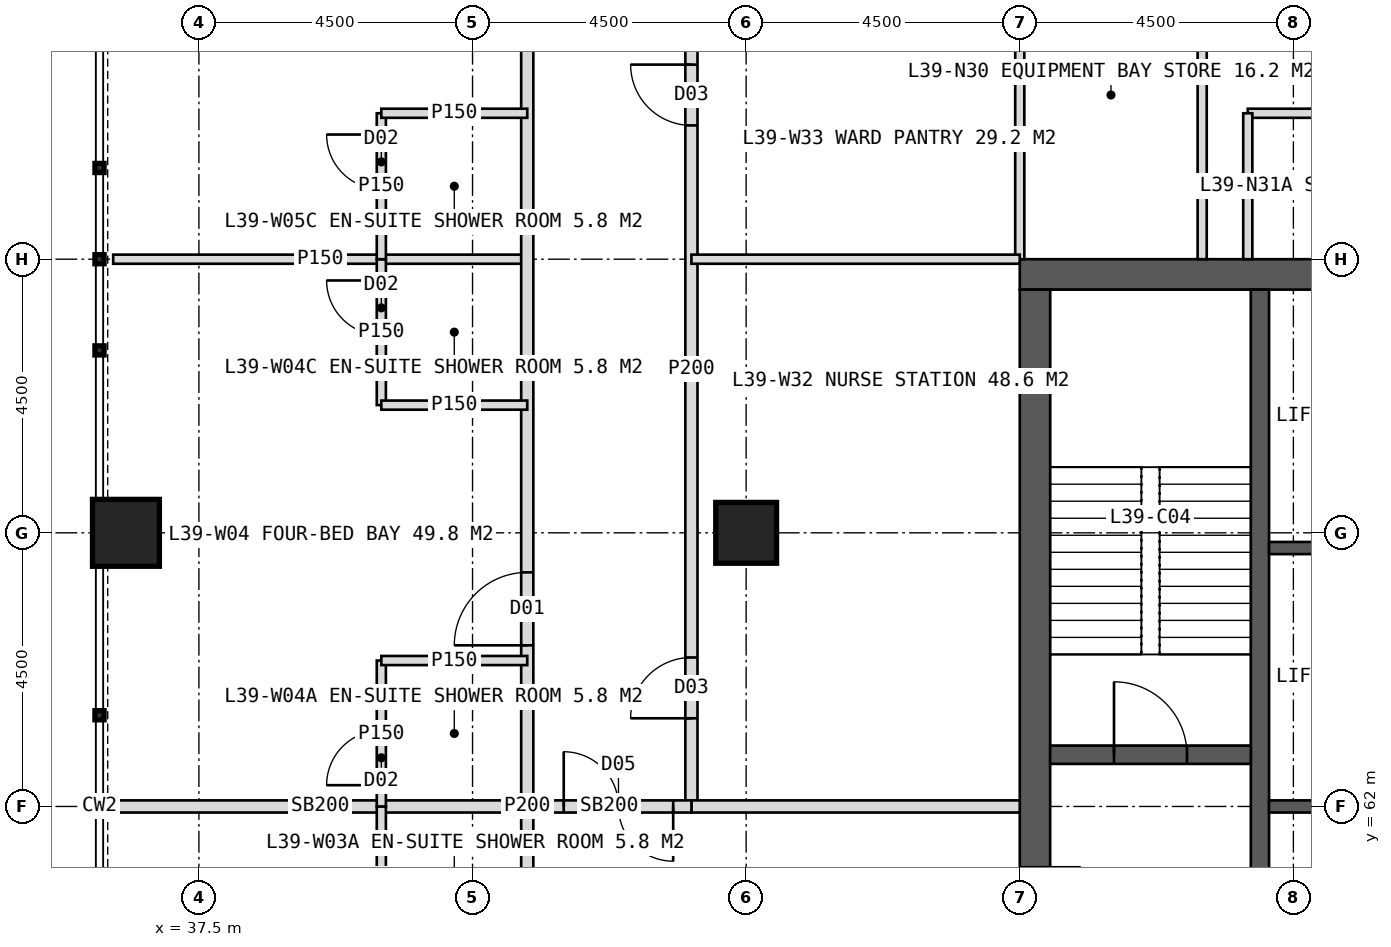
"""IFC4 building model, lengths in metres.
Left out: names, types, materials, properties, quantities, classifications, styles, units other than length and angle.
Written with IfcOpenShell. Run it as: python <this file> out.ifc"""

import sys

from ifc_helpers import new_model, si_unit, direction, frame, frame_2d, origin, origin_2d, place, context, subcontext, project, spatial, rectangle, hollow_rectangle, extrude, element, fill, save


model = new_model("IFC4")
c1 = context("Model", 3, precision=1e-05, world=origin(), true_north=direction((0.0, 1.0)))
c2 = subcontext(c1, "Body", "Model", "MODEL_VIEW")
j1 = project(units=[si_unit("LENGTHUNIT", "METRE"), si_unit("PLANEANGLEUNIT", "RADIAN")], contexts=[c1])
p1 = place(None, origin())
s1 = spatial("IfcSite", under=j1, at=p1, CompositionType="ELEMENT")
p2 = place(p1, origin())
s2 = spatial("IfcBuilding", under=s1, at=p2, CompositionType="ELEMENT")
p3 = place(p2, frame((0.0, 0.0, 164.0)))
s3 = spatial("IfcBuildingStorey", under=s2, at=p3, CompositionType="ELEMENT", Elevation=164.0)
p4 = place(p3, frame((51.0, 70.75, 0.0), z_axis=(0.0, 0.0, 1.0), x_axis=(1.0, 0.0, 0.0)))
e1 = element("IfcWall", 1, at=p4, inside=s3, PredefinedType="SHEAR", context=c2, shape_type="SweptSolid", body=[
    extrude(rectangle(XDim=18.0, YDim=0.5, at=frame_2d((9.0, 0.0))), origin(), (0.0, 0.0, 1.0), 4.0),
])
p5 = place(p4, frame((8.1, 0.0, 0.0)))
e2 = element("IfcOpeningElement", 2, at=p5, cuts=e1, PredefinedType="OPENING", context=c2, shape_type="SweptSolid", body=[
    extrude(rectangle(XDim=1.8, YDim=2.2, at=frame_2d((0.9, 1.1))), frame((0.0, 0.26, 0.0), z_axis=(0.0, -1.0, 0.0), x_axis=(1.0, 0.0, 0.0)), (0.0, 0.0, 1.0), 0.52),
])
p6 = place(p3, frame((51.25, 53.5, 0.0), z_axis=(0.0, 0.0, 1.0), x_axis=(0.0, 1.0, 0.0)))
e3 = element("IfcWall", 3, at=p6, inside=s3, PredefinedType="SHEAR", context=c2, shape_type="SweptSolid", body=[
    extrude(rectangle(XDim=17.0, YDim=0.5, at=frame_2d((8.5, 0.0))), origin(), (0.0, 0.0, 1.0), 4.0),
])
p7 = place(p6, frame((6.0, 0.0, 0.0)))
e4 = element("IfcOpeningElement", 4, at=p7, cuts=e3, PredefinedType="OPENING", context=c2, shape_type="SweptSolid", body=[
    extrude(rectangle(XDim=1.5, YDim=2.2, at=frame_2d((0.75, 1.1))), frame((0.0, 0.26, 0.0), z_axis=(0.0, -1.0, 0.0), x_axis=(1.0, 0.0, 0.0)), (0.0, 0.0, 1.0), 0.52),
])
p8 = place(p3, frame((54.95, 53.5, 0.0), z_axis=(0.0, 0.0, 1.0), x_axis=(0.0, 1.0, 0.0)))
e5 = element("IfcWall", 5, at=p8, inside=s3, PredefinedType="SHEAR", context=c2, shape_type="SweptSolid", body=[
    extrude(rectangle(XDim=17.0, YDim=0.3, at=frame_2d((8.5, 0.0))), origin(), (0.0, 0.0, 1.0), 4.0),
])
for number, where, z_axis, x_axis in (
    (6, (55.1, 62.0, 0.0), (0.0, 0.0, 1.0), (1.0, 0.0, 0.0)),
    (7, (55.1, 66.25, 0.0), (0.0, 0.0, 1.0), (1.0, 0.0, 0.0)),
):
    element("IfcWall", number, at=place(p3, frame(where, z_axis=z_axis, x_axis=x_axis)), inside=s3, PredefinedType="SHEAR", context=c2, shape_type="SweptSolid", body=[
        extrude(rectangle(XDim=3.05, YDim=0.2, at=frame_2d((1.525, 0.0))), origin(), (0.0, 0.0, 1.0), 4.0),
    ])
p9 = place(p3, frame((51.5, 62.85, 0.0), z_axis=(0.0, 0.0, 1.0), x_axis=(1.0, 0.0, 0.0)))
e8 = element("IfcWall", 8, at=p9, inside=s3, PredefinedType="SHEAR", context=c2, shape_type="SweptSolid", body=[
    extrude(rectangle(XDim=3.3, YDim=0.3, at=frame_2d((1.65, 0.0))), origin(), (0.0, 0.0, 1.0), 4.0),
])
p10 = place(p9, frame((1.05, 0.0, 0.0)))
e9 = element("IfcOpeningElement", 9, at=p10, cuts=e8, PredefinedType="OPENING", context=c2, shape_type="SweptSolid", body=[
    extrude(rectangle(XDim=1.2, YDim=2.1, at=frame_2d((0.6, 1.05))), frame((0.0, 0.16, 0.0), z_axis=(0.0, -1.0, 0.0), x_axis=(1.0, 0.0, 0.0)), (0.0, 0.0, 1.0), 0.32),
])
p11 = place(p3, frame((46.5, 66.5, 0.0), z_axis=(0.0, 0.0, 1.0), x_axis=(1.0, 0.0, 0.0)))
e10 = element("IfcColumn", 10, at=p11, inside=s3, PredefinedType="COLUMN", context=c2, shape_type="SweptSolid", body=[
    extrude(hollow_rectangle(XDim=1.0, YDim=1.0, WallThickness=0.1, at=origin_2d()), origin(), (0.0, 0.0, 1.0), 4.0),
])
p12 = place(p3, frame((36.3, 66.5, 0.0), z_axis=(0.0, 0.0, 1.0), x_axis=(1.0, 0.0, 0.0)))
e11 = element("IfcColumn", 11, at=p12, inside=s3, PredefinedType="COLUMN", context=c2, shape_type="SweptSolid", body=[
    extrude(hollow_rectangle(XDim=1.1, YDim=1.1, WallThickness=0.1, at=origin_2d()), origin(), (0.0, 0.0, 1.0), 4.0),
])
for number, where, z_axis, x_axis in (
    (12, (51.0, 71.0, 0.0), (0.0, 0.0, 1.0), (0.0, 1.0, 0.0)),
    (13, (54.0, 71.0, 0.0), (0.0, 0.0, 1.0), (0.0, 1.0, 0.0)),
):
    element("IfcWall", number, at=place(p3, frame(where, z_axis=z_axis, x_axis=x_axis)), inside=s3, PredefinedType="PARTITIONING", context=c2, shape_type="SweptSolid", body=[
        extrude(rectangle(XDim=5.4, YDim=0.15, at=frame_2d((2.7, 0.0))), origin(), (0.0, 0.0, 1.0), 3.75),
    ])
p13 = place(p3, frame((54.75, 73.4, 0.0), z_axis=(0.0, 0.0, 1.0), x_axis=(1.0, 0.0, 0.0)))
e14 = element("IfcWall", 14, at=p13, inside=s3, PredefinedType="PARTITIONING", context=c2, shape_type="SweptSolid", body=[
    extrude(rectangle(XDim=3.0, YDim=0.15, at=frame_2d((1.5, 0.0))), origin(), (0.0, 0.0, 1.0), 3.75),
])
p14 = place(p3, frame((54.75, 71.0, 0.0), z_axis=(0.0, 0.0, 1.0), x_axis=(0.0, 1.0, 0.0)))
e15 = element("IfcWall", 15, at=p14, inside=s3, PredefinedType="PARTITIONING", context=c2, shape_type="SweptSolid", body=[
    extrude(rectangle(XDim=2.4, YDim=0.15, at=frame_2d((1.2, 0.0))), origin(), (0.0, 0.0, 1.0), 3.75),
])
p15 = place(p3, frame((42.9, 62.0, 0.0), z_axis=(0.0, 0.0, 1.0), x_axis=(-1.0, 0.0, 0.0)))
e16 = element("IfcWall", 16, at=p15, inside=s3, PredefinedType="SOLIDWALL", context=c2, shape_type="SweptSolid", body=[
    extrude(rectangle(XDim=6.81, YDim=0.2, at=frame_2d((3.405, 0.0))), origin(), (0.0, 0.0, 1.0), 2.95),
])
p16 = place(p3, frame((42.9, 71.0, 0.0), z_axis=(0.0, 0.0, 1.0), x_axis=(-1.0, 0.0, 0.0)))
e17 = element("IfcWall", 17, at=p16, inside=s3, PredefinedType="PARTITIONING", context=c2, shape_type="SweptSolid", body=[
    extrude(rectangle(XDim=6.81, YDim=0.15, at=frame_2d((3.405, 0.0))), origin(), (0.0, 0.0, 1.0), 3.75),
])
p17 = place(p3, frame((42.9, 44.9, 0.0), z_axis=(0.0, 0.0, 1.0), x_axis=(0.0, 1.0, 0.0)))
e18 = element("IfcWall", 18, at=p17, inside=s3, PredefinedType="PARTITIONING", context=c2, shape_type="SweptSolid", body=[
    extrude(rectangle(XDim=34.2, YDim=0.2, at=frame_2d((17.1, 0.0))), origin(), (0.0, 0.0, 1.0), 3.75),
])
p18 = place(p17, frame((2.15, 0.0, 0.0)))
e19 = element("IfcOpeningElement", 19, at=p18, cuts=e18, PredefinedType="OPENING", context=c2, shape_type="SweptSolid", body=[
    extrude(rectangle(XDim=1.2, YDim=2.2, at=frame_2d((0.6, 1.1))), frame((0.0, 0.11, 0.0), z_axis=(0.0, -1.0, 0.0), x_axis=(1.0, 0.0, 0.0)), (0.0, 0.0, 1.0), 0.22),
])
p19 = place(p17, frame((9.25, 0.0, 0.0)))
e20 = element("IfcOpeningElement", 20, at=p19, cuts=e18, PredefinedType="OPENING", context=c2, shape_type="SweptSolid", body=[
    extrude(rectangle(XDim=1.2, YDim=2.2, at=frame_2d((0.6, 1.1))), frame((0.0, 0.11, 0.0), z_axis=(0.0, -1.0, 0.0), x_axis=(1.0, 0.0, 0.0)), (0.0, 0.0, 1.0), 0.22),
])
p20 = place(p17, frame((13.25, 0.0, 0.0)))
e21 = element("IfcOpeningElement", 21, at=p20, cuts=e18, PredefinedType="OPENING", context=c2, shape_type="SweptSolid", body=[
    extrude(rectangle(XDim=1.2, YDim=2.2, at=frame_2d((0.6, 1.1))), frame((0.0, 0.11, 0.0), z_axis=(0.0, -1.0, 0.0), x_axis=(1.0, 0.0, 0.0)), (0.0, 0.0, 1.0), 0.22),
])
p21 = place(p17, frame((19.75, 0.0, 0.0)))
e22 = element("IfcOpeningElement", 22, at=p21, cuts=e18, PredefinedType="OPENING", context=c2, shape_type="SweptSolid", body=[
    extrude(rectangle(XDim=1.2, YDim=2.2, at=frame_2d((0.6, 1.1))), frame((0.0, 0.11, 0.0), z_axis=(0.0, -1.0, 0.0), x_axis=(1.0, 0.0, 0.0)), (0.0, 0.0, 1.0), 0.22),
])
p22 = place(p17, frame((30.35, 0.0, 0.0)))
e23 = element("IfcOpeningElement", 23, at=p22, cuts=e18, PredefinedType="OPENING", context=c2, shape_type="SweptSolid", body=[
    extrude(rectangle(XDim=1.2, YDim=2.2, at=frame_2d((0.6, 1.1))), frame((0.0, 0.11, 0.0), z_axis=(0.0, -1.0, 0.0), x_axis=(1.0, 0.0, 0.0)), (0.0, 0.0, 1.0), 0.22),
])
p23 = place(p3, frame((40.5, 59.6, 0.0), z_axis=(0.0, 0.0, 1.0), x_axis=(0.0, 1.0, 0.0)))
e24 = element("IfcWall", 24, at=p23, inside=s3, PredefinedType="PARTITIONING", context=c2, shape_type="SweptSolid", body=[
    extrude(rectangle(XDim=2.4, YDim=0.15, at=frame_2d((1.2, 0.0))), origin(), (0.0, 0.0, 1.0), 3.75),
])
p24 = place(p23, frame((0.35, 0.0, 0.0)))
e25 = element("IfcOpeningElement", 25, at=p24, cuts=e24, PredefinedType="OPENING", context=c2, shape_type="SweptSolid", body=[
    extrude(rectangle(XDim=0.9, YDim=2.1, at=frame_2d((0.45, 1.05))), frame((0.0, 0.085, 0.0), z_axis=(0.0, -1.0, 0.0), x_axis=(1.0, 0.0, 0.0)), (0.0, 0.0, 1.0), 0.17),
])
p25 = place(p3, frame((40.5, 62.0, 0.0), z_axis=(0.0, 0.0, 1.0), x_axis=(0.0, 1.0, 0.0)))
e26 = element("IfcWall", 26, at=p25, inside=s3, PredefinedType="PARTITIONING", context=c2, shape_type="SweptSolid", body=[
    extrude(rectangle(XDim=2.4, YDim=0.15, at=frame_2d((1.2, 0.0))), origin(), (0.0, 0.0, 1.0), 3.75),
])
p26 = place(p25, frame((0.35, 0.0, 0.0)))
e27 = element("IfcOpeningElement", 27, at=p26, cuts=e26, PredefinedType="OPENING", context=c2, shape_type="SweptSolid", body=[
    extrude(rectangle(XDim=0.9, YDim=2.1, at=frame_2d((0.45, 1.05))), frame((0.0, 0.085, 0.0), z_axis=(0.0, -1.0, 0.0), x_axis=(1.0, 0.0, 0.0)), (0.0, 0.0, 1.0), 0.17),
])
p27 = place(p3, frame((42.9, 64.4, 0.0), z_axis=(0.0, 0.0, 1.0), x_axis=(-1.0, 0.0, 0.0)))
e28 = element("IfcWall", 28, at=p27, inside=s3, PredefinedType="PARTITIONING", context=c2, shape_type="SweptSolid", body=[
    extrude(rectangle(XDim=2.4, YDim=0.15, at=frame_2d((1.2, 0.0))), origin(), (0.0, 0.0, 1.0), 3.75),
])
p28 = place(p3, frame((40.5, 68.6, 0.0), z_axis=(0.0, 0.0, 1.0), x_axis=(0.0, 1.0, 0.0)))
e29 = element("IfcWall", 29, at=p28, inside=s3, PredefinedType="PARTITIONING", context=c2, shape_type="SweptSolid", body=[
    extrude(rectangle(XDim=2.4, YDim=0.15, at=frame_2d((1.2, 0.0))), origin(), (0.0, 0.0, 1.0), 3.75),
])
p29 = place(p28, frame((1.15, 0.0, 0.0)))
e30 = element("IfcOpeningElement", 30, at=p29, cuts=e29, PredefinedType="OPENING", context=c2, shape_type="SweptSolid", body=[
    extrude(rectangle(XDim=0.9, YDim=2.1, at=frame_2d((0.45, 1.05))), frame((0.0, 0.085, 0.0), z_axis=(0.0, -1.0, 0.0), x_axis=(1.0, 0.0, 0.0)), (0.0, 0.0, 1.0), 0.17),
])
p30 = place(p3, frame((42.9, 68.6, 0.0), z_axis=(0.0, 0.0, 1.0), x_axis=(-1.0, 0.0, 0.0)))
e31 = element("IfcWall", 31, at=p30, inside=s3, PredefinedType="PARTITIONING", context=c2, shape_type="SweptSolid", body=[
    extrude(rectangle(XDim=2.4, YDim=0.15, at=frame_2d((1.2, 0.0))), origin(), (0.0, 0.0, 1.0), 3.75),
])
p31 = place(p3, frame((40.5, 71.0, 0.0), z_axis=(0.0, 0.0, 1.0), x_axis=(0.0, 1.0, 0.0)))
e32 = element("IfcWall", 32, at=p31, inside=s3, PredefinedType="PARTITIONING", context=c2, shape_type="SweptSolid", body=[
    extrude(rectangle(XDim=2.4, YDim=0.15, at=frame_2d((1.2, 0.0))), origin(), (0.0, 0.0, 1.0), 3.75),
])
p32 = place(p31, frame((1.15, 0.0, 0.0)))
e33 = element("IfcOpeningElement", 33, at=p32, cuts=e32, PredefinedType="OPENING", context=c2, shape_type="SweptSolid", body=[
    extrude(rectangle(XDim=0.9, YDim=2.1, at=frame_2d((0.45, 1.05))), frame((0.0, 0.085, 0.0), z_axis=(0.0, -1.0, 0.0), x_axis=(1.0, 0.0, 0.0)), (0.0, 0.0, 1.0), 0.17),
])
p33 = place(p3, frame((42.9, 73.4, 0.0), z_axis=(0.0, 0.0, 1.0), x_axis=(-1.0, 0.0, 0.0)))
e34 = element("IfcWall", 34, at=p33, inside=s3, PredefinedType="PARTITIONING", context=c2, shape_type="SweptSolid", body=[
    extrude(rectangle(XDim=2.4, YDim=0.15, at=frame_2d((1.2, 0.0))), origin(), (0.0, 0.0, 1.0), 3.75),
])
p34 = place(p3, frame((45.6, 62.0, 0.0), z_axis=(0.0, 0.0, 1.0), x_axis=(0.0, 1.0, 0.0)))
e35 = element("IfcWall", 35, at=p34, inside=s3, PredefinedType="PARTITIONING", context=c2, shape_type="SweptSolid", body=[
    extrude(rectangle(XDim=14.4, YDim=0.2, at=frame_2d((7.2, 0.0))), origin(), (0.0, 0.0, 1.0), 3.75),
])
p35 = place(p34, frame((1.45, 0.0, 0.0)))
e36 = element("IfcOpeningElement", 36, at=p35, cuts=e35, PredefinedType="OPENING", context=c2, shape_type="SweptSolid", body=[
    extrude(rectangle(XDim=1.0, YDim=2.1, at=frame_2d((0.5, 1.05))), frame((0.0, 0.11, 0.0), z_axis=(0.0, -1.0, 0.0), x_axis=(1.0, 0.0, 0.0)), (0.0, 0.0, 1.0), 0.22),
])
p36 = place(p34, frame((11.2, 0.0, 0.0)))
e37 = element("IfcOpeningElement", 37, at=p36, cuts=e35, PredefinedType="OPENING", context=c2, shape_type="SweptSolid", body=[
    extrude(rectangle(XDim=1.0, YDim=2.1, at=frame_2d((0.5, 1.05))), frame((0.0, 0.11, 0.0), z_axis=(0.0, -1.0, 0.0), x_axis=(1.0, 0.0, 0.0)), (0.0, 0.0, 1.0), 0.22),
])
p37 = place(p3, frame((51.0, 62.0, 0.0), z_axis=(0.0, 0.0, 1.0), x_axis=(-1.0, 0.0, 0.0)))
e38 = element("IfcWall", 38, at=p37, inside=s3, PredefinedType="SOLIDWALL", context=c2, shape_type="SweptSolid", body=[
    extrude(rectangle(XDim=5.4, YDim=0.2, at=frame_2d((2.7, 0.0))), origin(), (0.0, 0.0, 1.0), 2.95),
])
p38 = place(p3, frame((51.0, 71.0, 0.0), z_axis=(0.0, 0.0, 1.0), x_axis=(-1.0, 0.0, 0.0)))
e39 = element("IfcWall", 39, at=p38, inside=s3, PredefinedType="PARTITIONING", context=c2, shape_type="SweptSolid", body=[
    extrude(rectangle(XDim=5.4, YDim=0.15, at=frame_2d((2.7, 0.0))), origin(), (0.0, 0.0, 1.0), 3.75),
])
p39 = place(p3, frame((45.6, 62.0, 0.0), z_axis=(0.0, 0.0, 1.0), x_axis=(-1.0, 0.0, 0.0)))
e40 = element("IfcWall", 40, at=p39, inside=s3, PredefinedType="SOLIDWALL", context=c2, shape_type="SweptSolid", body=[
    extrude(rectangle(XDim=2.7, YDim=0.2, at=frame_2d((1.35, 0.0))), origin(), (0.0, 0.0, 1.0), 2.95),
])
p40 = place(p39, frame((0.3, 0.0, 0.0)))
e41 = element("IfcOpeningElement", 41, at=p40, cuts=e40, PredefinedType="OPENING", context=c2, shape_type="SweptSolid", body=[
    extrude(rectangle(XDim=1.8, YDim=2.2, at=frame_2d((0.9, 1.1))), frame((0.0, 0.11, 0.0), z_axis=(0.0, -1.0, 0.0), x_axis=(1.0, 0.0, 0.0)), (0.0, 0.0, 1.0), 0.22),
])
p41 = place(p21, origin())
e42 = element("IfcDoor", 42, at=p41, inside=s3, OperationType="SINGLE_SWING_LEFT", PredefinedType="DOOR", context=c2, shape_type="SweptSolid", body=[
    extrude(rectangle(XDim=1.2, YDim=2.2, at=frame_2d((0.6, 1.1))), frame((0.0, 0.025, 0.0), z_axis=(0.0, -1.0, 0.0), x_axis=(1.0, 0.0, 0.0)), (0.0, 0.0, 1.0), 0.05),
])
fill(e22, e42)
p42 = place(p26, origin())
e43 = element("IfcDoor", 43, at=p42, inside=s3, OperationType="SINGLE_SWING_LEFT", PredefinedType="DOOR", context=c2, shape_type="SweptSolid", body=[
    extrude(rectangle(XDim=0.9, YDim=2.1, at=frame_2d((0.45, 1.05))), frame((0.0, 0.025, 0.0), z_axis=(0.0, -1.0, 0.0), x_axis=(1.0, 0.0, 0.0)), (0.0, 0.0, 1.0), 0.05),
])
fill(e27, e43)
p43 = place(p29, origin())
e44 = element("IfcDoor", 44, at=p43, inside=s3, OperationType="SINGLE_SWING_RIGHT", PredefinedType="DOOR", context=c2, shape_type="SweptSolid", body=[
    extrude(rectangle(XDim=0.9, YDim=2.1, at=frame_2d((0.45, 1.05))), frame((0.0, 0.025, 0.0), z_axis=(0.0, -1.0, 0.0), x_axis=(1.0, 0.0, 0.0)), (0.0, 0.0, 1.0), 0.05),
])
fill(e30, e44)
p44 = place(p32, origin())
e45 = element("IfcDoor", 45, at=p44, inside=s3, OperationType="SINGLE_SWING_RIGHT", PredefinedType="DOOR", context=c2, shape_type="SweptSolid", body=[
    extrude(rectangle(XDim=0.9, YDim=2.1, at=frame_2d((0.45, 1.05))), frame((0.0, 0.025, 0.0), z_axis=(0.0, -1.0, 0.0), x_axis=(1.0, 0.0, 0.0)), (0.0, 0.0, 1.0), 0.05),
])
fill(e33, e45)
p45 = place(p35, origin())
e46 = element("IfcDoor", 46, at=p45, inside=s3, OperationType="SINGLE_SWING_LEFT", PredefinedType="DOOR", context=c2, shape_type="SweptSolid", body=[
    extrude(rectangle(XDim=1.0, YDim=2.1, at=frame_2d((0.5, 1.05))), frame((0.0, 0.025, 0.0), z_axis=(0.0, -1.0, 0.0), x_axis=(1.0, 0.0, 0.0)), (0.0, 0.0, 1.0), 0.05),
])
fill(e36, e46)
p46 = place(p36, origin())
e47 = element("IfcDoor", 47, at=p46, inside=s3, OperationType="SINGLE_SWING_RIGHT", PredefinedType="DOOR", context=c2, shape_type="SweptSolid", body=[
    extrude(rectangle(XDim=1.0, YDim=2.1, at=frame_2d((0.5, 1.05))), frame((0.0, 0.025, 0.0), z_axis=(0.0, -1.0, 0.0), x_axis=(1.0, 0.0, 0.0)), (0.0, 0.0, 1.0), 0.05),
])
fill(e37, e47)
p47 = place(p40, origin())
e48 = element("IfcDoor", 48, at=p47, inside=s3, OperationType="DOUBLE_DOOR_DOUBLE_SWING", PredefinedType="DOOR", context=c2, shape_type="SweptSolid", body=[
    extrude(rectangle(XDim=1.8, YDim=2.2, at=frame_2d((0.9, 1.1))), frame((0.0, 0.025, 0.0), z_axis=(0.0, -1.0, 0.0), x_axis=(1.0, 0.0, 0.0)), (0.0, 0.0, 1.0), 0.05),
])
fill(e41, e48)
p48 = place(p10, origin())
e49 = element("IfcDoor", 49, at=p48, inside=s3, OperationType="SINGLE_SWING_LEFT", PredefinedType="DOOR", context=c2, shape_type="SweptSolid", body=[
    extrude(rectangle(XDim=1.2, YDim=2.1, at=frame_2d((0.6, 1.05))), frame((0.0, 0.025, 0.0), z_axis=(0.0, -1.0, 0.0), x_axis=(1.0, 0.0, 0.0)), (0.0, 0.0, 1.0), 0.05),
])
fill(e9, e49)
save(model, sys.argv[1])
